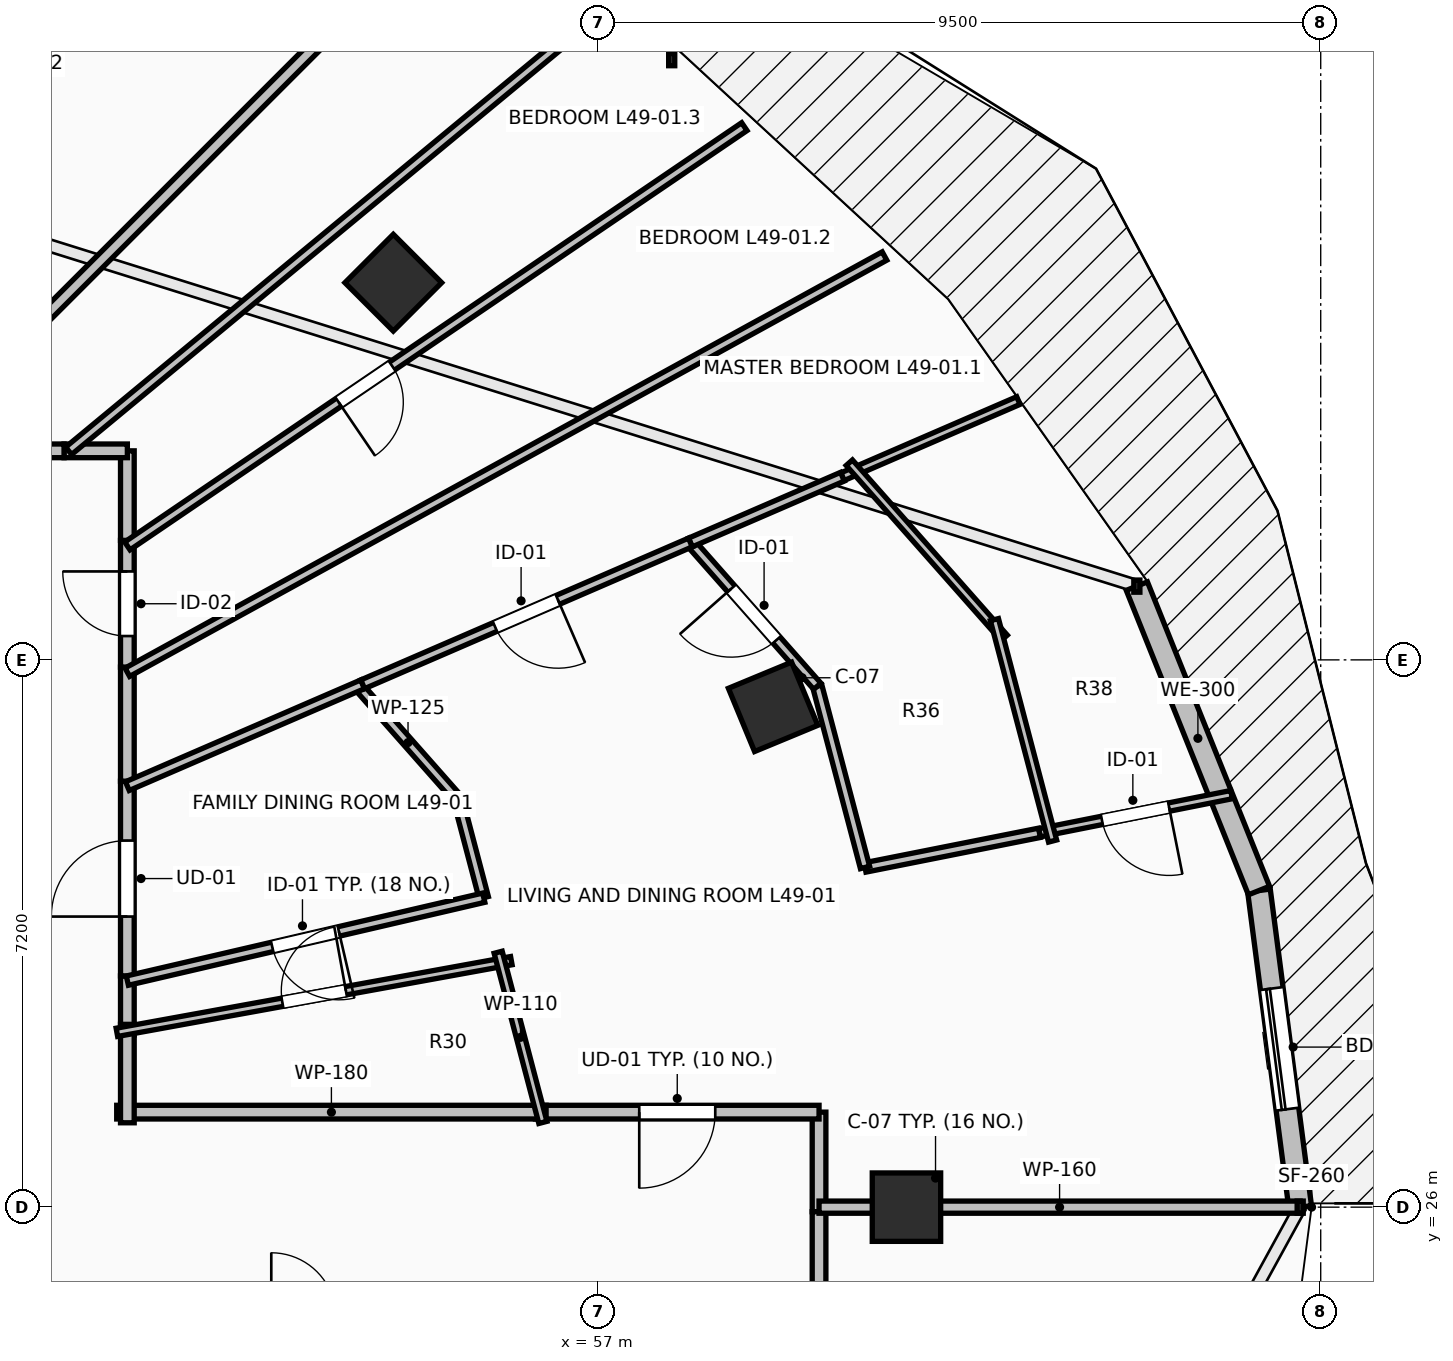
"""IFC4 building model, lengths in metres.
Left out: names, types, materials, properties, quantities, classifications, styles, units other than length and angle.
Written with IfcOpenShell. Run it as: python <this file> out.ifc"""

import sys

from ifc_helpers import new_model, si_unit, direction, frame, frame_2d, origin, origin_2d, place, context, subcontext, project, spatial, rectangle, extrude, element, fill, save


model = new_model("IFC4")
c1 = context("Model", 3, precision=1e-05, world=origin(), true_north=direction((0.0, 1.0)))
c2 = subcontext(c1, "Body", "Model", "MODEL_VIEW")
j1 = project(units=[si_unit("LENGTHUNIT", "METRE"), si_unit("PLANEANGLEUNIT", "RADIAN")], contexts=[c1])
p1 = place(None, origin())
s1 = spatial("IfcSite", under=j1, at=p1, CompositionType="ELEMENT")
p2 = place(p1, origin())
s2 = spatial("IfcBuilding", under=s1, at=p2, CompositionType="ELEMENT")
p3 = place(p2, frame((0.0, 0.0, 182.6)))
s3 = spatial("IfcBuildingStorey", under=s2, at=p3, CompositionType="ELEMENT", Elevation=182.6)
for number, where, z_axis, x_axis in (
    (1, (61.05, 26.0, 0.0), (0.0, 0.0, 1.0), (1.0, 0.0, 0.0)),
    (2, (59.295, 32.582, 0.0), (0.0, 0.0, 1.0), (0.924, 0.383, 0.0)),
    (3, (54.299, 38.162, 0.0), (0.0, 0.0, 1.0), (0.707, 0.707, 0.0)),
):
    element("IfcColumn", number, at=place(p3, frame(where, z_axis=z_axis, x_axis=x_axis)), inside=s3, PredefinedType="COLUMN", context=c2, shape_type="SweptSolid", body=[
        extrude(rectangle(XDim=0.9, YDim=0.9, at=origin_2d()), origin(), (0.0, 0.0, 1.0), 3.5),
    ])
p4 = place(p3, frame((66.23, 26.0, 0.0), z_axis=(0.0, 0.0, 1.0), x_axis=(-0.129147853268, 0.991625348605, 0.0)))
e4 = element("IfcWall", 4, at=p4, inside=s3, PredefinedType="STANDARD", context=c2, shape_type="SweptSolid", body=[
    extrude(rectangle(XDim=4.2, YDim=0.3, at=frame_2d((2.1, 0.0))), origin(), (0.0, 0.0, 1.0), 3.24),
])
p5 = place(p4, frame((1.3, 0.0, 0.0)))
e5 = element("IfcOpeningElement", 5, at=p5, cuts=e4, PredefinedType="OPENING", context=c2, shape_type="SweptSolid", body=[
    extrude(rectangle(XDim=1.6, YDim=2.3, at=frame_2d((0.8, 1.15))), frame((0.0, 0.165, 0.0), z_axis=(0.0, -1.0, 0.0), x_axis=(1.0, 0.0, 0.0)), (0.0, 0.0, 1.0), 0.33),
])
p6 = place(p3, frame((65.688, 30.165, 0.0), z_axis=(0.0, 0.0, 1.0), x_axis=(-0.372268409848, 0.928125116043, 0.0)))
e6 = element("IfcWall", 6, at=p6, inside=s3, PredefinedType="STANDARD", context=c2, shape_type="SweptSolid", body=[
    extrude(rectangle(XDim=4.315, YDim=0.3, at=frame_2d((2.158, 0.0))), origin(), (0.0, 0.0, 1.0), 3.24),
])
p7 = place(p3, frame((59.9, 25.94, 0.0), z_axis=(0.0, 0.0, 1.0), x_axis=(0.0, 1.0, 0.0)))
e7 = element("IfcWall", 7, at=p7, inside=s3, PredefinedType="PARTITIONING", context=c2, shape_type="SweptSolid", body=[
    extrude(rectangle(XDim=1.31, YDim=0.18, at=frame_2d((0.655, 0.0))), origin(), (0.0, 0.0, 1.0), 2.432),
])
p8 = place(p3, frame((59.9, 27.25, 0.0), z_axis=(0.0, 0.0, 1.0), x_axis=(-1.0, 0.0, 0.0)))
e8 = element("IfcWall", 8, at=p8, inside=s3, PredefinedType="PARTITIONING", context=c2, shape_type="SweptSolid", body=[
    extrude(rectangle(XDim=3.731, YDim=0.18, at=frame_2d((1.865, 0.0))), origin(), (0.0, 0.0, 1.0), 2.874),
])
p9 = place(p8, frame((1.365, 0.0, 0.0)))
e9 = element("IfcOpeningElement", 9, at=p9, cuts=e8, PredefinedType="OPENING", context=c2, shape_type="SweptSolid", body=[
    extrude(rectangle(XDim=1.0, YDim=2.15, at=frame_2d((0.5, 1.075))), frame((0.0, 0.105, 0.0), z_axis=(0.0, -1.0, 0.0), x_axis=(1.0, 0.0, 0.0)), (0.0, 0.0, 1.0), 0.21),
])
p10 = place(p3, frame((50.8, 28.265, 0.0), z_axis=(0.0, 0.0, 1.0), x_axis=(0.0, 1.0, 0.0)))
e10 = element("IfcWall", 10, at=p10, inside=s3, PredefinedType="PARTITIONING", context=c2, shape_type="SweptSolid", body=[
    extrude(rectangle(XDim=0.777, YDim=0.18, at=frame_2d((0.389, 0.0))), origin(), (0.0, 0.0, 1.0), 3.24),
])
p11 = place(p3, frame((50.8, 29.042, 0.0), z_axis=(0.0, 0.0, 1.0), x_axis=(0.0, 1.0, 0.0)))
e11 = element("IfcWall", 11, at=p11, inside=s3, PredefinedType="PARTITIONING", context=c2, shape_type="SweptSolid", body=[
    extrude(rectangle(XDim=2.562, YDim=0.18, at=frame_2d((1.281, 0.0))), origin(), (0.0, 0.0, 1.0), 3.24),
])
p12 = place(p11, frame((0.781, 0.0, 0.0)))
e12 = element("IfcOpeningElement", 12, at=p12, cuts=e11, PredefinedType="OPENING", context=c2, shape_type="SweptSolid", body=[
    extrude(rectangle(XDim=1.0, YDim=2.15, at=frame_2d((0.5, 1.075))), frame((0.0, 0.105, 0.0), z_axis=(0.0, -1.0, 0.0), x_axis=(1.0, 0.0, 0.0)), (0.0, 0.0, 1.0), 0.21),
])
p13 = place(p3, frame((56.309, 27.25, 0.0), z_axis=(0.0, 0.0, 1.0), x_axis=(-1.0, 0.0, 0.0)))
e13 = element("IfcWall", 13, at=p13, inside=s3, PredefinedType="PARTITIONING", context=c2, shape_type="SweptSolid", body=[
    extrude(rectangle(XDim=5.649, YDim=0.18, at=frame_2d((2.825, 0.0))), origin(), (0.0, 0.0, 1.0), 2.432),
])
p14 = place(p3, frame((50.8, 27.11, 0.0), z_axis=(0.0, 0.0, 1.0), x_axis=(0.0, 1.0, 0.0)))
e14 = element("IfcWall", 14, at=p14, inside=s3, PredefinedType="PARTITIONING", context=c2, shape_type="SweptSolid", body=[
    extrude(rectangle(XDim=1.295, YDim=0.18, at=frame_2d((0.647, 0.0))), origin(), (0.0, 0.0, 1.0), 2.432),
])
p15 = place(p3, frame((50.8, 31.604, 0.0), z_axis=(0.0, 0.0, 1.0), x_axis=(0.0, 1.0, 0.0)))
e15 = element("IfcWall", 15, at=p15, inside=s3, PredefinedType="PARTITIONING", context=c2, shape_type="SweptSolid", body=[
    extrude(rectangle(XDim=1.501, YDim=0.18, at=frame_2d((0.75, 0.0))), origin(), (0.0, 0.0, 1.0), 2.432),
])
p16 = place(p3, frame((50.8, 33.105, 0.0), z_axis=(0.0, 0.0, 1.0), x_axis=(0.0, 1.0, 0.0)))
e16 = element("IfcWall", 16, at=p16, inside=s3, PredefinedType="PARTITIONING", context=c2, shape_type="SweptSolid", body=[
    extrude(rectangle(XDim=1.667, YDim=0.18, at=frame_2d((0.833, 0.0))), origin(), (0.0, 0.0, 1.0), 2.432),
])
p17 = place(p16, frame((0.408, 0.0, 0.0)))
e17 = element("IfcOpeningElement", 17, at=p17, cuts=e16, PredefinedType="OPENING", context=c2, shape_type="SweptSolid", body=[
    extrude(rectangle(XDim=0.85, YDim=2.1, at=frame_2d((0.425, 1.05))), frame((0.0, 0.105, 0.0), z_axis=(0.0, -1.0, 0.0), x_axis=(1.0, 0.0, 0.0)), (0.0, 0.0, 1.0), 0.21),
])
p18 = place(p3, frame((50.8, 34.772, 0.0), z_axis=(0.0, 0.0, 1.0), x_axis=(0.0, 1.0, 0.0)))
e18 = element("IfcWall", 18, at=p18, inside=s3, PredefinedType="PARTITIONING", context=c2, shape_type="SweptSolid", body=[
    extrude(rectangle(XDim=1.178, YDim=0.18, at=frame_2d((0.589, 0.0))), origin(), (0.0, 0.0, 1.0), 2.432),
])
p19 = place(p3, frame((50.8, 35.95, 0.0), z_axis=(0.0, 0.0, 1.0), x_axis=(-1.0, 0.0, 0.0)))
e19 = element("IfcWall", 19, at=p19, inside=s3, PredefinedType="PARTITIONING", context=c2, shape_type="SweptSolid", body=[
    extrude(rectangle(XDim=0.833, YDim=0.18, at=frame_2d((0.417, 0.0))), origin(), (0.0, 0.0, 1.0), 3.24),
])
p20 = place(p3, frame((49.967, 35.95, 0.0), z_axis=(0.0, 0.0, 1.0), x_axis=(-1.0, 0.0, 0.0)))
e20 = element("IfcWall", 20, at=p20, inside=s3, PredefinedType="PARTITIONING", context=c2, shape_type="SweptSolid", body=[
    extrude(rectangle(XDim=2.077, YDim=0.18, at=frame_2d((1.039, 0.0))), origin(), (0.0, 0.0, 1.0), 2.432),
])
p21 = place(p20, frame((0.333, 0.0, 0.0)))
e21 = element("IfcOpeningElement", 21, at=p21, cuts=e20, PredefinedType="OPENING", context=c2, shape_type="SweptSolid", body=[
    extrude(rectangle(XDim=0.85, YDim=2.1, at=frame_2d((0.425, 1.05))), frame((0.0, 0.105, 0.0), z_axis=(0.0, -1.0, 0.0), x_axis=(1.0, 0.0, 0.0)), (0.0, 0.0, 1.0), 0.21),
])
p22 = place(p3, frame((59.9, 24.55, 0.0), z_axis=(0.0, 0.0, 1.0), x_axis=(0.0, 1.0, 0.0)))
e22 = element("IfcWall", 22, at=p22, inside=s3, PredefinedType="PARTITIONING", context=c2, shape_type="SweptSolid", body=[
    extrude(rectangle(XDim=1.39, YDim=0.18, at=frame_2d((0.695, 0.0))), origin(), (0.0, 0.0, 1.0), 2.432),
])
p23 = place(p3, frame((53.838, 32.853, 0.0), z_axis=(0.0, 0.0, 1.0), x_axis=(0.662046229388, -0.749463001191, 0.0)))
e23 = element("IfcWall", 23, at=p23, inside=s3, PredefinedType="PARTITIONING", context=c2, shape_type="SweptSolid", body=[
    extrude(rectangle(XDim=1.977, YDim=0.125, at=frame_2d((0.989, 0.0))), origin(), (0.0, 0.0, 1.0), 2.432),
])
p24 = place(p3, frame((55.147, 31.371, 0.0), z_axis=(0.0, 0.0, 1.0), x_axis=(0.25443966192, -0.967088650767, 0.0)))
e24 = element("IfcWall", 24, at=p24, inside=s3, PredefinedType="PARTITIONING", context=c2, shape_type="SweptSolid", body=[
    extrude(rectangle(XDim=1.344, YDim=0.125, at=frame_2d((0.672, 0.0))), origin(), (0.0, 0.0, 1.0), 3.24),
])
p25 = place(p3, frame((55.489, 30.071, 0.0), z_axis=(0.0, 0.0, 1.0), x_axis=(-0.973980178663, -0.226633209333, 0.0)))
e25 = element("IfcWall", 25, at=p25, inside=s3, PredefinedType="PARTITIONING", context=c2, shape_type="SweptSolid", body=[
    extrude(rectangle(XDim=4.814, YDim=0.125, at=frame_2d((2.407, 0.0))), origin(), (0.0, 0.0, 1.0), 2.922),
])
p26 = place(p25, frame((1.957, 0.0, 0.0)))
e26 = element("IfcOpeningElement", 26, at=p26, cuts=e25, PredefinedType="OPENING", context=c2, shape_type="SweptSolid", body=[
    extrude(rectangle(XDim=0.9, YDim=2.1, at=frame_2d((0.45, 1.05))), frame((0.0, 0.077, 0.0), z_axis=(0.0, -1.0, 0.0), x_axis=(1.0, 0.0, 0.0)), (0.0, 0.0, 1.0), 0.155),
])
p27 = place(p3, frame((53.896, 32.879, 0.0), z_axis=(0.0, 0.0, 1.0), x_axis=(-0.917742985146, -0.39717478925, 0.0)))
e27 = element("IfcWall", 27, at=p27, inside=s3, PredefinedType="PARTITIONING", context=c2, shape_type="SweptSolid", body=[
    extrude(rectangle(XDim=3.374, YDim=0.125, at=frame_2d((1.687, 0.0))), origin(), (0.0, 0.0, 1.0), 2.432),
])
p28 = place(p3, frame((50.662, 28.3, 0.0), z_axis=(0.0, 0.0, 1.0), x_axis=(0.983892120625, 0.178763237197, 0.0)))
e28 = element("IfcWall", 28, at=p28, inside=s3, PredefinedType="PARTITIONING", context=c2, shape_type="SweptSolid", body=[
    extrude(rectangle(XDim=5.274, YDim=0.11, at=frame_2d((2.637, 0.0))), origin(), (0.0, 0.0, 1.0), 2.874),
])
p29 = place(p28, frame((2.212, 0.0, 0.0)))
e29 = element("IfcOpeningElement", 29, at=p29, cuts=e28, PredefinedType="OPENING", context=c2, shape_type="SweptSolid", body=[
    extrude(rectangle(XDim=0.85, YDim=2.1, at=frame_2d((0.425, 1.05))), frame((0.0, 0.07, 0.0), z_axis=(0.0, -1.0, 0.0), x_axis=(1.0, 0.0, 0.0)), (0.0, 0.0, 1.0), 0.14),
])
p30 = place(p3, frame((55.678, 29.354, 0.0), z_axis=(0.0, 0.0, 1.0), x_axis=(0.254057219361, -0.96718919002, 0.0)))
e30 = element("IfcWall", 30, at=p30, inside=s3, PredefinedType="PARTITIONING", context=c2, shape_type="SweptSolid", body=[
    extrude(rectangle(XDim=2.315, YDim=0.11, at=frame_2d((1.157, 0.0))), origin(), (0.0, 0.0, 1.0), 2.432),
])
p31 = place(p3, frame((65.327, 31.427, 0.0), z_axis=(0.0, 0.0, 1.0), x_axis=(-0.980809558385, -0.194968228644, 0.0)))
e31 = element("IfcWall", 31, at=p31, inside=s3, PredefinedType="PARTITIONING", context=c2, shape_type="SweptSolid", body=[
    extrude(rectangle(XDim=2.577, YDim=0.11, at=frame_2d((1.289, 0.0))), origin(), (0.0, 0.0, 1.0), 3.24),
])
p32 = place(p31, frame((0.838, 0.0, 0.0)))
e32 = element("IfcOpeningElement", 32, at=p32, cuts=e31, PredefinedType="OPENING", context=c2, shape_type="SweptSolid", body=[
    extrude(rectangle(XDim=0.9, YDim=2.1, at=frame_2d((0.45, 1.05))), frame((0.0, 0.07, 0.0), z_axis=(0.0, -1.0, 0.0), x_axis=(1.0, 0.0, 0.0)), (0.0, 0.0, 1.0), 0.14),
])
p33 = place(p3, frame((60.208, 35.609, 0.0), z_axis=(0.0, 0.0, 1.0), x_axis=(0.917692098887, 0.397292350341, 0.0)))
e33 = element("IfcWall", 33, at=p33, inside=s3, PredefinedType="PARTITIONING", context=c2, shape_type="SweptSolid", body=[
    extrude(rectangle(XDim=2.522, YDim=0.11, at=frame_2d((1.261, 0.0))), origin(), (0.0, 0.0, 1.0), 3.24),
])
p34 = place(p3, frame((62.8, 30.925, 0.0), z_axis=(0.0, 0.0, 1.0), x_axis=(-0.980840670114, -0.194811652245, 0.0)))
e34 = element("IfcWall", 34, at=p34, inside=s3, PredefinedType="PARTITIONING", context=c2, shape_type="SweptSolid", body=[
    extrude(rectangle(XDim=2.34, YDim=0.125, at=frame_2d((1.17, 0.0))), origin(), (0.0, 0.0, 1.0), 3.24),
])
p35 = place(p3, frame((60.505, 30.469, 0.0), z_axis=(0.0, 0.0, 1.0), x_axis=(-0.254702896388, 0.967019355841, 0.0)))
e35 = element("IfcWall", 35, at=p35, inside=s3, PredefinedType="PARTITIONING", context=c2, shape_type="SweptSolid", body=[
    extrude(rectangle(XDim=2.465, YDim=0.125, at=frame_2d((1.233, 0.0))), origin(), (0.0, 0.0, 1.0), 3.24),
])
p36 = place(p3, frame((59.877, 32.853, 0.0), z_axis=(0.0, 0.0, 1.0), x_axis=(-0.661957655691, 0.749541234404, 0.0)))
e36 = element("IfcWall", 36, at=p36, inside=s3, PredefinedType="PARTITIONING", context=c2, shape_type="SweptSolid", body=[
    extrude(rectangle(XDim=2.523, YDim=0.125, at=frame_2d((1.261, 0.0))), origin(), (0.0, 0.0, 1.0), 3.24),
])
p37 = place(p36, frame((0.811, 0.0, 0.0)))
e37 = element("IfcOpeningElement", 37, at=p37, cuts=e36, PredefinedType="OPENING", context=c2, shape_type="SweptSolid", body=[
    extrude(rectangle(XDim=0.9, YDim=2.1, at=frame_2d((0.45, 1.05))), frame((0.0, 0.077, 0.0), z_axis=(0.0, -1.0, 0.0), x_axis=(1.0, 0.0, 0.0)), (0.0, 0.0, 1.0), 0.155),
])
p38 = place(p3, frame((58.207, 34.744, 0.0), z_axis=(0.0, 0.0, 1.0), x_axis=(0.917748928086, 0.397161056748, 0.0)))
e38 = element("IfcWall", 38, at=p38, inside=s3, PredefinedType="PARTITIONING", context=c2, shape_type="SweptSolid", body=[
    extrude(rectangle(XDim=2.18, YDim=0.125, at=frame_2d((1.09, 0.0))), origin(), (0.0, 0.0, 1.0), 3.24),
])
p39 = place(p3, frame((58.207, 34.744, 0.0), z_axis=(0.0, 0.0, 1.0), x_axis=(-0.917771035239, -0.397109968241, 0.0)))
e39 = element("IfcWall", 39, at=p39, inside=s3, PredefinedType="PARTITIONING", context=c2, shape_type="SweptSolid", body=[
    extrude(rectangle(XDim=4.697, YDim=0.125, at=frame_2d((2.349, 0.0))), origin(), (0.0, 0.0, 1.0), 2.432),
])
p40 = place(p39, frame((1.898, 0.0, 0.0)))
e40 = element("IfcOpeningElement", 40, at=p40, cuts=e39, PredefinedType="OPENING", context=c2, shape_type="SweptSolid", body=[
    extrude(rectangle(XDim=0.9, YDim=2.1, at=frame_2d((0.45, 1.05))), frame((0.0, 0.077, 0.0), z_axis=(0.0, -1.0, 0.0), x_axis=(1.0, 0.0, 0.0)), (0.0, 0.0, 1.0), 0.155),
])
p41 = place(p3, frame((59.9, 26.0, 0.0), z_axis=(0.0, 0.0, 1.0), x_axis=(1.0, 0.0, 0.0)))
e41 = element("IfcWall", 41, at=p41, inside=s3, PredefinedType="PARTITIONING", context=c2, shape_type="SweptSolid", body=[
    extrude(rectangle(XDim=6.329, YDim=0.16, at=frame_2d((3.165, 0.0))), origin(), (0.0, 0.0, 1.0), 2.432),
])
p42 = place(p3, frame((60.298, 35.794, 0.0), z_axis=(0.0, 0.0, 1.0), x_axis=(0.662277588726, -0.74925856383, 0.0)))
e42 = element("IfcWall", 42, at=p42, inside=s3, PredefinedType="PARTITIONING", context=c2, shape_type="SweptSolid", body=[
    extrude(rectangle(XDim=3.076, YDim=0.11, at=frame_2d((1.538, 0.0))), origin(), (0.0, 0.0, 1.0), 3.24),
])
p43 = place(p3, frame((62.208, 33.729, 0.0), z_axis=(0.0, 0.0, 1.0), x_axis=(0.254058335644, -0.967188896798, 0.0)))
e43 = element("IfcWall", 43, at=p43, inside=s3, PredefinedType="PARTITIONING", context=c2, shape_type="SweptSolid", body=[
    extrude(rectangle(XDim=3.012, YDim=0.11, at=frame_2d((1.506, 0.0))), origin(), (0.0, 0.0, 1.0), 3.24),
])
p44 = place(p3, frame((60.761, 38.513, 0.0), z_axis=(0.0, 0.0, 1.0), x_axis=(-0.876315654865, -0.481737348602, 0.0)))
e44 = element("IfcWall", 44, at=p44, inside=s3, PredefinedType="PARTITIONING", context=c2, shape_type="SweptSolid", body=[
    extrude(rectangle(XDim=11.367, YDim=0.125, at=frame_2d((5.684, 0.0))), origin(), (0.0, 0.0, 1.0), 2.432),
])
p45 = place(p3, frame((58.917, 40.215, 0.0), z_axis=(0.0, 0.0, 1.0), x_axis=(-0.827087951184, -0.562072522906, 0.0)))
e45 = element("IfcWall", 45, at=p45, inside=s3, PredefinedType="PARTITIONING", context=c2, shape_type="SweptSolid", body=[
    extrude(rectangle(XDim=9.814, YDim=0.125, at=frame_2d((4.907, 0.0))), origin(), (0.0, 0.0, 1.0), 2.432),
])
p46 = place(p45, frame((5.602, 0.0, 0.0)))
e46 = element("IfcOpeningElement", 46, at=p46, cuts=e45, PredefinedType="OPENING", context=c2, shape_type="SweptSolid", body=[
    extrude(rectangle(XDim=0.85, YDim=2.1, at=frame_2d((0.425, 1.05))), frame((0.0, 0.077, 0.0), z_axis=(0.0, -1.0, 0.0), x_axis=(1.0, 0.0, 0.0)), (0.0, 0.0, 1.0), 0.155),
])
p47 = place(p3, frame((56.98, 41.702, 0.0), z_axis=(0.0, 0.0, 1.0), x_axis=(-0.770511618294, -0.637425953405, 0.0)))
e47 = element("IfcWall", 47, at=p47, inside=s3, PredefinedType="PARTITIONING", context=c2, shape_type="SweptSolid", body=[
    extrude(rectangle(XDim=9.024, YDim=0.125, at=frame_2d((4.512, 0.0))), origin(), (0.0, 0.0, 1.0), 2.774),
])
p48 = place(p3, frame((54.959, 42.959, 0.0), z_axis=(0.0, 0.0, 1.0), x_axis=(-0.707106781187, -0.707106781187, 0.0)))
e48 = element("IfcWall", 48, at=p48, inside=s3, PredefinedType="PARTITIONING", context=c2, shape_type="SweptSolid", body=[
    extrude(rectangle(XDim=8.492, YDim=0.16, at=frame_2d((4.246, 0.0))), origin(), (0.0, 0.0, 1.0), 2.774),
])
p49 = place(p5, origin())
e49 = element("IfcDoor", 49, at=p49, inside=s3, OperationType="SLIDING_TO_LEFT", PredefinedType="DOOR", context=c2, shape_type="SweptSolid", body=[
    extrude(rectangle(XDim=1.6, YDim=2.3, at=frame_2d((0.8, 1.15))), frame((0.0, 0.025, 0.0), z_axis=(0.0, -1.0, 0.0), x_axis=(1.0, 0.0, 0.0)), (0.0, 0.0, 1.0), 0.05),
])
fill(e5, e49)
p50 = place(p9, origin())
e50 = element("IfcDoor", 50, at=p50, inside=s3, OperationType="SINGLE_SWING_RIGHT", PredefinedType="DOOR", context=c2, shape_type="SweptSolid", body=[
    extrude(rectangle(XDim=1.0, YDim=2.15, at=frame_2d((0.5, 1.075))), frame((0.0, 0.025, 0.0), z_axis=(0.0, -1.0, 0.0), x_axis=(1.0, 0.0, 0.0)), (0.0, 0.0, 1.0), 0.05),
])
fill(e9, e50)
p51 = place(p12, origin())
e51 = element("IfcDoor", 51, at=p51, inside=s3, OperationType="SINGLE_SWING_LEFT", PredefinedType="DOOR", context=c2, shape_type="SweptSolid", body=[
    extrude(rectangle(XDim=1.0, YDim=2.15, at=frame_2d((0.5, 1.075))), frame((0.0, 0.025, 0.0), z_axis=(0.0, -1.0, 0.0), x_axis=(1.0, 0.0, 0.0)), (0.0, 0.0, 1.0), 0.05),
])
fill(e12, e51)
p52 = place(p26, origin())
e52 = element("IfcDoor", 52, at=p52, inside=s3, OperationType="SINGLE_SWING_LEFT", PredefinedType="DOOR", context=c2, shape_type="SweptSolid", body=[
    extrude(rectangle(XDim=0.9, YDim=2.1, at=frame_2d((0.45, 1.05))), frame((0.0, 0.025, 0.0), z_axis=(0.0, -1.0, 0.0), x_axis=(1.0, 0.0, 0.0)), (0.0, 0.0, 1.0), 0.05),
])
fill(e26, e52)
p53 = place(p29, origin())
e53 = element("IfcDoor", 53, at=p53, inside=s3, OperationType="SINGLE_SWING_RIGHT", PredefinedType="DOOR", context=c2, shape_type="SweptSolid", body=[
    extrude(rectangle(XDim=0.85, YDim=2.1, at=frame_2d((0.425, 1.05))), frame((0.0, 0.025, 0.0), z_axis=(0.0, -1.0, 0.0), x_axis=(1.0, 0.0, 0.0)), (0.0, 0.0, 1.0), 0.05),
])
fill(e29, e53)
p54 = place(p32, origin())
e54 = element("IfcDoor", 54, at=p54, inside=s3, OperationType="SINGLE_SWING_LEFT", PredefinedType="DOOR", context=c2, shape_type="SweptSolid", body=[
    extrude(rectangle(XDim=0.9, YDim=2.1, at=frame_2d((0.45, 1.05))), frame((0.0, 0.025, 0.0), z_axis=(0.0, -1.0, 0.0), x_axis=(1.0, 0.0, 0.0)), (0.0, 0.0, 1.0), 0.05),
])
fill(e32, e54)
p55 = place(p37, origin())
e55 = element("IfcDoor", 55, at=p55, inside=s3, OperationType="SINGLE_SWING_RIGHT", PredefinedType="DOOR", context=c2, shape_type="SweptSolid", body=[
    extrude(rectangle(XDim=0.9, YDim=2.1, at=frame_2d((0.45, 1.05))), frame((0.0, 0.025, 0.0), z_axis=(0.0, -1.0, 0.0), x_axis=(1.0, 0.0, 0.0)), (0.0, 0.0, 1.0), 0.05),
])
fill(e37, e55)
p56 = place(p40, origin())
e56 = element("IfcDoor", 56, at=p56, inside=s3, OperationType="SINGLE_SWING_LEFT", PredefinedType="DOOR", context=c2, shape_type="SweptSolid", body=[
    extrude(rectangle(XDim=0.9, YDim=2.1, at=frame_2d((0.45, 1.05))), frame((0.0, 0.025, 0.0), z_axis=(0.0, -1.0, 0.0), x_axis=(1.0, 0.0, 0.0)), (0.0, 0.0, 1.0), 0.05),
])
fill(e40, e56)
p57 = place(p17, origin())
e57 = element("IfcDoor", 57, at=p57, inside=s3, OperationType="SINGLE_SWING_RIGHT", PredefinedType="DOOR", context=c2, shape_type="SweptSolid", body=[
    extrude(rectangle(XDim=0.85, YDim=2.1, at=frame_2d((0.425, 1.05))), frame((0.0, 0.025, 0.0), z_axis=(0.0, -1.0, 0.0), x_axis=(1.0, 0.0, 0.0)), (0.0, 0.0, 1.0), 0.05),
])
fill(e17, e57)
p58 = place(p46, origin())
e58 = element("IfcDoor", 58, at=p58, inside=s3, OperationType="SINGLE_SWING_RIGHT", PredefinedType="DOOR", context=c2, shape_type="SweptSolid", body=[
    extrude(rectangle(XDim=0.85, YDim=2.1, at=frame_2d((0.425, 1.05))), frame((0.0, 0.025, 0.0), z_axis=(0.0, -1.0, 0.0), x_axis=(1.0, 0.0, 0.0)), (0.0, 0.0, 1.0), 0.05),
])
fill(e46, e58)
save(model, sys.argv[1])
